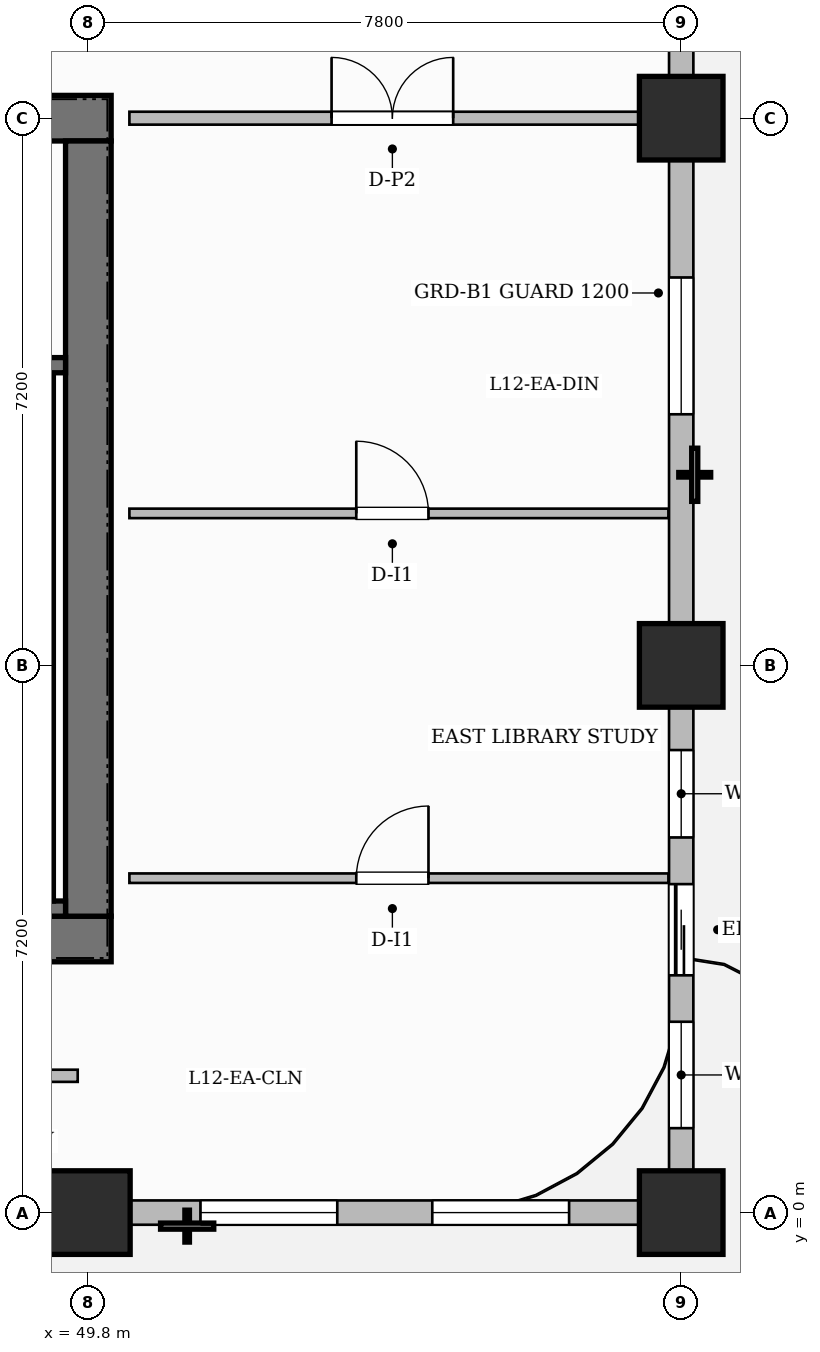
"""IFC4 building model, lengths in metres.
Left out: names, types, materials, properties, quantities, classifications, styles, units other than length and angle.
Written with IfcOpenShell. Run it as: python <this file> out.ifc"""

import sys

from ifc_helpers import new_model, si_unit, direction, frame, frame_2d, origin, origin_2d, place, context, subcontext, project, spatial, rectangle, extrude, source, transform, mapped, element, fill, save


model = new_model("IFC4")
c1 = context("Model", 3, precision=1e-05, world=origin(), true_north=direction((0.0, 1.0)))
c2 = subcontext(c1, "Body", "Model", "MODEL_VIEW")
j1 = project(units=[si_unit("LENGTHUNIT", "METRE"), si_unit("PLANEANGLEUNIT", "RADIAN")], contexts=[c1])
p1 = place(None, origin())
s1 = spatial("IfcSite", under=j1, at=p1, CompositionType="ELEMENT")
p2 = place(p1, origin())
s2 = spatial("IfcBuilding", under=s1, at=p2, CompositionType="ELEMENT")
p3 = place(p2, frame((0.0, 0.0, 54.6)))
s3 = spatial("IfcBuildingStorey", under=s2, at=p3, CompositionType="ELEMENT", Elevation=54.6)
p4 = place(p3, frame((34.5, 3.6, 0.0), z_axis=(0.0, 0.0, 1.0), x_axis=(1.0, 0.0, 0.0)))
e1 = element("IfcWall", 1, at=p4, inside=s3, PredefinedType="SHEAR", context=c2, shape_type="SweptSolid", body=[
    extrude(rectangle(XDim=15.6, YDim=0.6, at=frame_2d((7.8, 0.0))), origin(), (0.0, 0.0, 1.0), 3.7),
])
p5 = place(p4, frame((4.77, 0.0, 0.0)))
e2 = element("IfcOpeningElement", 2, at=p5, cuts=e1, PredefinedType="OPENING", context=c2, shape_type="SweptSolid", body=[
    extrude(rectangle(XDim=0.9, YDim=2.1, at=frame_2d((0.45, 1.05))), frame((0.0, 0.31, 0.0), z_axis=(0.0, -1.0, 0.0), x_axis=(1.0, 0.0, 0.0)), (0.0, 0.0, 1.0), 0.62),
])
p6 = place(p4, frame((7.15, 0.0, 0.0)))
e3 = element("IfcOpeningElement", 3, at=p6, cuts=e1, PredefinedType="OPENING", context=c2, shape_type="SweptSolid", body=[
    extrude(rectangle(XDim=0.9, YDim=2.1, at=frame_2d((0.45, 1.05))), frame((0.0, 0.31, 0.0), z_axis=(0.0, -1.0, 0.0), x_axis=(1.0, 0.0, 0.0)), (0.0, 0.0, 1.0), 0.62),
])
p7 = place(p3, frame((34.5, 14.4, 0.0), z_axis=(0.0, 0.0, 1.0), x_axis=(1.0, 0.0, 0.0)))
e4 = element("IfcWall", 4, at=p7, inside=s3, PredefinedType="SHEAR", context=c2, shape_type="SweptSolid", body=[
    extrude(rectangle(XDim=15.6, YDim=0.6, at=frame_2d((7.8, 0.0))), origin(), (0.0, 0.0, 1.0), 3.7),
])
p8 = place(p7, frame((5.43, 0.0, 0.0)))
e5 = element("IfcOpeningElement", 5, at=p8, cuts=e4, PredefinedType="OPENING", context=c2, shape_type="SweptSolid", body=[
    extrude(rectangle(XDim=1.5, YDim=2.2, at=frame_2d((0.75, 1.1))), frame((0.0, 0.31, 0.0), z_axis=(0.0, -1.0, 0.0), x_axis=(1.0, 0.0, 0.0)), (0.0, 0.0, 1.0), 0.62),
])
p9 = place(p7, frame((1.645, 0.0, 0.0)))
e6 = element("IfcOpeningElement", 6, at=p9, cuts=e4, PredefinedType="OPENING", context=c2, shape_type="SweptSolid", body=[
    extrude(rectangle(XDim=1.05, YDim=2.15, at=frame_2d((0.525, 1.075))), frame((0.0, 0.31, 0.0), z_axis=(0.0, -1.0, 0.0), x_axis=(1.0, 0.0, 0.0)), (0.0, 0.0, 1.0), 0.62),
])
p10 = place(p7, frame((11.275, 0.0, 0.0)))
e7 = element("IfcOpeningElement", 7, at=p10, cuts=e4, PredefinedType="OPENING", context=c2, shape_type="SweptSolid", body=[
    extrude(rectangle(XDim=1.05, YDim=2.15, at=frame_2d((0.525, 1.075))), frame((0.0, 0.31, 0.0), z_axis=(0.0, -1.0, 0.0), x_axis=(1.0, 0.0, 0.0)), (0.0, 0.0, 1.0), 0.62),
])
p11 = place(p3, frame((49.8, 3.9, 0.0), z_axis=(0.0, 0.0, 1.0), x_axis=(0.0, 1.0, 0.0)))
e8 = element("IfcWall", 8, at=p11, inside=s3, PredefinedType="SHEAR", context=c2, shape_type="SweptSolid", body=[
    extrude(rectangle(XDim=10.2, YDim=0.6, at=frame_2d((5.1, 0.0))), origin(), (0.0, 0.0, 1.0), 3.7),
])
m1 = source(origin(), c2, "Body", "SweptSolid", [
    extrude(rectangle(XDim=1.1, YDim=1.1, at=origin_2d()), origin(), (0.0, 0.0, 1.0), 3.7),
])
for number, where, z_axis, x_axis in (
    (9, (49.8, 0.0, 0.0), (0.0, 0.0, 1.0), (1.0, 0.0, 0.0)),
    (10, (57.6, 0.0, 0.0), (0.0, 0.0, 1.0), (1.0, 0.0, 0.0)),
    (11, (57.6, 7.2, 0.0), (0.0, 0.0, 1.0), (1.0, 0.0, 0.0)),
    (12, (57.6, 14.4, 0.0), (0.0, 0.0, 1.0), (1.0, 0.0, 0.0)),
):
    element("IfcColumn", number, at=place(p3, frame(where, z_axis=z_axis, x_axis=x_axis)), inside=s3, PredefinedType="COLUMN", context=c2, shape_type="MappedRepresentation", body=[
        mapped(m1, transform((0.0, 0.0, 0.0), scale=1.0)),
    ])
p12 = place(p3, frame((43.12, 4.0, 0.0), z_axis=(0.0, 0.0, 1.0), x_axis=(1.0, 0.0, 0.0)))
e13 = element("IfcWall", 13, at=p12, inside=s3, PredefinedType="SHEAR", context=c2, shape_type="SweptSolid", body=[
    extrude(rectangle(XDim=6.38, YDim=0.2, at=frame_2d((3.19, 0.0))), origin(), (0.0, 0.0, 1.0), 3.7),
])
p13 = place(p3, frame((49.24, 4.1, 0.0), z_axis=(0.0, 0.0, 1.0), x_axis=(0.0, 1.0, 0.0)))
e14 = element("IfcWall", 14, at=p13, inside=s3, PredefinedType="SHEAR", context=c2, shape_type="SweptSolid", body=[
    extrude(rectangle(XDim=6.95, YDim=0.2, at=frame_2d((3.475, 0.0))), origin(), (0.0, 0.0, 1.0), 3.7),
])
p14 = place(p3, frame((43.12, 11.15, 0.0), z_axis=(0.0, 0.0, 1.0), x_axis=(1.0, 0.0, 0.0)))
e15 = element("IfcWall", 15, at=p14, inside=s3, PredefinedType="SHEAR", context=c2, shape_type="SweptSolid", body=[
    extrude(rectangle(XDim=6.38, YDim=0.2, at=frame_2d((3.19, 0.0))), origin(), (0.0, 0.0, 1.0), 3.7),
])
p15 = place(p14, frame((1.045, 0.0, 0.0)))
e16 = element("IfcOpeningElement", 16, at=p15, cuts=e15, PredefinedType="OPENING", context=c2, shape_type="SweptSolid", body=[
    extrude(rectangle(XDim=1.05, YDim=2.2, at=frame_2d((0.525, 1.1))), frame((0.0, 0.11, 0.0), z_axis=(0.0, -1.0, 0.0), x_axis=(1.0, 0.0, 0.0)), (0.0, 0.0, 1.0), 0.22),
])
p16 = place(p14, frame((4.125, 0.0, 0.0)))
e17 = element("IfcOpeningElement", 17, at=p16, cuts=e15, PredefinedType="OPENING", context=c2, shape_type="SweptSolid", body=[
    extrude(rectangle(XDim=1.05, YDim=2.2, at=frame_2d((0.525, 1.1))), frame((0.0, 0.11, 0.0), z_axis=(0.0, -1.0, 0.0), x_axis=(1.0, 0.0, 0.0)), (0.0, 0.0, 1.0), 0.22),
])
p17 = place(p3, frame((30.29, 1.8, 0.0), z_axis=(0.0, 0.0, 1.0), x_axis=(1.0, 0.0, 0.0)))
e18 = element("IfcWall", 18, at=p17, inside=s3, PredefinedType="PARTITIONING", context=c2, shape_type="SweptSolid", body=[
    extrude(rectangle(XDim=19.37, YDim=0.16, at=frame_2d((9.685, 0.0))), origin(), (0.0, 0.0, 1.0), 3.45),
])
p18 = place(p17, frame((2.916, 0.0, 0.0)))
e19 = element("IfcOpeningElement", 19, at=p18, cuts=e18, PredefinedType="OPENING", context=c2, shape_type="SweptSolid", body=[
    extrude(rectangle(XDim=0.9, YDim=2.15, at=frame_2d((0.45, 1.075))), frame((0.0, 0.09, 0.0), z_axis=(0.0, -1.0, 0.0), x_axis=(1.0, 0.0, 0.0)), (0.0, 0.0, 1.0), 0.18),
])
p19 = place(p17, frame((9.66, 0.0, 0.0)))
e20 = element("IfcOpeningElement", 20, at=p19, cuts=e18, PredefinedType="OPENING", context=c2, shape_type="SweptSolid", body=[
    extrude(rectangle(XDim=0.9, YDim=2.15, at=frame_2d((0.45, 1.075))), frame((0.0, 0.09, 0.0), z_axis=(0.0, -1.0, 0.0), x_axis=(1.0, 0.0, 0.0)), (0.0, 0.0, 1.0), 0.18),
])
p20 = place(p17, frame((15.86, 0.0, 0.0)))
e21 = element("IfcOpeningElement", 21, at=p20, cuts=e18, PredefinedType="OPENING", context=c2, shape_type="SweptSolid", body=[
    extrude(rectangle(XDim=0.9, YDim=2.15, at=frame_2d((0.45, 1.075))), frame((0.0, 0.09, 0.0), z_axis=(0.0, -1.0, 0.0), x_axis=(1.0, 0.0, 0.0)), (0.0, 0.0, 1.0), 0.18),
])
p21 = place(p3, frame((50.34, 14.4, 0.0), z_axis=(0.0, 0.0, 1.0), x_axis=(1.0, 0.0, 0.0)))
e22 = element("IfcWall", 22, at=p21, inside=s3, PredefinedType="PARTITIONING", context=c2, shape_type="SweptSolid", body=[
    extrude(rectangle(XDim=7.07, YDim=0.17, at=frame_2d((3.535, 0.0))), origin(), (0.0, 0.0, 1.0), 2.885),
])
p22 = place(p21, frame((2.66, 0.0, 0.0)))
e23 = element("IfcOpeningElement", 23, at=p22, cuts=e22, PredefinedType="OPENING", context=c2, shape_type="SweptSolid", body=[
    extrude(rectangle(XDim=1.6, YDim=2.4, at=frame_2d((0.8, 1.2))), frame((0.0, 0.095, 0.0), z_axis=(0.0, -1.0, 0.0), x_axis=(1.0, 0.0, 0.0)), (0.0, 0.0, 1.0), 0.19),
])
p23 = place(p3, frame((50.34, 9.2, 0.0), z_axis=(0.0, 0.0, 1.0), x_axis=(1.0, 0.0, 0.0)))
e24 = element("IfcWall", 24, at=p23, inside=s3, PredefinedType="PARTITIONING", context=c2, shape_type="SweptSolid", body=[
    extrude(rectangle(XDim=7.092, YDim=0.125, at=frame_2d((3.546, 0.0))), origin(), (0.0, 0.0, 1.0), 3.45),
])
p24 = place(p23, frame((2.985, 0.0, 0.0)))
e25 = element("IfcOpeningElement", 25, at=p24, cuts=e24, PredefinedType="OPENING", context=c2, shape_type="SweptSolid", body=[
    extrude(rectangle(XDim=0.95, YDim=2.15, at=frame_2d((0.475, 1.075))), frame((0.0, 0.073, 0.0), z_axis=(0.0, -1.0, 0.0), x_axis=(1.0, 0.0, 0.0)), (0.0, 0.0, 1.0), 0.145),
])
p25 = place(p3, frame((50.34, 4.4, 0.0), z_axis=(0.0, 0.0, 1.0), x_axis=(1.0, 0.0, 0.0)))
e26 = element("IfcWall", 26, at=p25, inside=s3, PredefinedType="PARTITIONING", context=c2, shape_type="SweptSolid", body=[
    extrude(rectangle(XDim=7.092, YDim=0.125, at=frame_2d((3.546, 0.0))), origin(), (0.0, 0.0, 1.0), 3.45),
])
p26 = place(p25, frame((2.985, 0.0, 0.0)))
e27 = element("IfcOpeningElement", 27, at=p26, cuts=e26, PredefinedType="OPENING", context=c2, shape_type="SweptSolid", body=[
    extrude(rectangle(XDim=0.95, YDim=2.15, at=frame_2d((0.475, 1.075))), frame((0.0, 0.073, 0.0), z_axis=(0.0, -1.0, 0.0), x_axis=(1.0, 0.0, 0.0)), (0.0, 0.0, 1.0), 0.145),
])
p27 = place(p3, frame((14.4, 0.0, 0.0), z_axis=(0.0, 0.0, 1.0), x_axis=(1.0, 0.0, 0.0)))
e28 = element("IfcWall", 28, at=p27, inside=s3, PredefinedType="SOLIDWALL", context=c2, shape_type="SweptSolid", body=[
    extrude(rectangle(XDim=43.2, YDim=0.32, at=frame_2d((21.6, 0.0))), origin(), (0.0, 0.0, 1.0), 2.885),
])
p28 = place(p27, frame((1.5, 0.0, 0.0)))
e29 = element("IfcOpeningElement", 29, at=p28, cuts=e28, PredefinedType="OPENING", context=c2, shape_type="SweptSolid", body=[
    extrude(rectangle(XDim=1.2, YDim=2.2, at=frame_2d((0.6, 1.1))), frame((0.0, 0.17, 0.0), z_axis=(0.0, -1.0, 0.0), x_axis=(1.0, 0.0, 0.0)), (0.0, 0.0, 1.0), 0.34),
])
p29 = place(p27, frame((4.654, 0.0, 0.8)))
e30 = element("IfcOpeningElement", 30, at=p29, cuts=e28, PredefinedType="OPENING", context=c2, shape_type="SweptSolid", body=[
    extrude(rectangle(XDim=1.4, YDim=1.85, at=frame_2d((0.7, 0.925))), frame((0.0, 0.17, 0.0), z_axis=(0.0, -1.0, 0.0), x_axis=(1.0, 0.0, 0.0)), (0.0, 0.0, 1.0), 0.34),
])
p30 = place(p27, frame((8.181, 0.0, 0.8)))
e31 = element("IfcOpeningElement", 31, at=p30, cuts=e28, PredefinedType="OPENING", context=c2, shape_type="SweptSolid", body=[
    extrude(rectangle(XDim=0.95, YDim=1.75, at=frame_2d((0.475, 0.875))), frame((0.0, 0.17, 0.0), z_axis=(0.0, -1.0, 0.0), x_axis=(1.0, 0.0, 0.0)), (0.0, 0.0, 1.0), 0.34),
])
p31 = place(p27, frame((10.564, 0.0, 0.8)))
e32 = element("IfcOpeningElement", 32, at=p31, cuts=e28, PredefinedType="OPENING", context=c2, shape_type="SweptSolid", body=[
    extrude(rectangle(XDim=1.8, YDim=1.85, at=frame_2d((0.9, 0.925))), frame((0.0, 0.17, 0.0), z_axis=(0.0, -1.0, 0.0), x_axis=(1.0, 0.0, 0.0)), (0.0, 0.0, 1.0), 0.34),
])
p32 = place(p27, frame((16.804, 0.0, 0.8)))
e33 = element("IfcOpeningElement", 33, at=p32, cuts=e28, PredefinedType="OPENING", context=c2, shape_type="SweptSolid", body=[
    extrude(rectangle(XDim=1.8, YDim=1.85, at=frame_2d((0.9, 0.925))), frame((0.0, 0.17, 0.0), z_axis=(0.0, -1.0, 0.0), x_axis=(1.0, 0.0, 0.0)), (0.0, 0.0, 1.0), 0.34),
])
p33 = place(p27, frame((21.521, 0.0, 0.8)))
e34 = element("IfcOpeningElement", 34, at=p33, cuts=e28, PredefinedType="OPENING", context=c2, shape_type="SweptSolid", body=[
    extrude(rectangle(XDim=0.95, YDim=1.75, at=frame_2d((0.475, 0.875))), frame((0.0, 0.17, 0.0), z_axis=(0.0, -1.0, 0.0), x_axis=(1.0, 0.0, 0.0)), (0.0, 0.0, 1.0), 0.34),
])
p34 = place(p27, frame((23.904, 0.0, 0.8)))
e35 = element("IfcOpeningElement", 35, at=p34, cuts=e28, PredefinedType="OPENING", context=c2, shape_type="SweptSolid", body=[
    extrude(rectangle(XDim=1.8, YDim=1.85, at=frame_2d((0.9, 0.925))), frame((0.0, 0.17, 0.0), z_axis=(0.0, -1.0, 0.0), x_axis=(1.0, 0.0, 0.0)), (0.0, 0.0, 1.0), 0.34),
])
p35 = place(p27, frame((29.681, 0.0, 0.8)))
e36 = element("IfcOpeningElement", 36, at=p35, cuts=e28, PredefinedType="OPENING", context=c2, shape_type="SweptSolid", body=[
    extrude(rectangle(XDim=1.8, YDim=1.85, at=frame_2d((0.9, 0.925))), frame((0.0, 0.17, 0.0), z_axis=(0.0, -1.0, 0.0), x_axis=(1.0, 0.0, 0.0)), (0.0, 0.0, 1.0), 0.34),
])
p36 = place(p27, frame((32.327, 0.0, 0.8)))
e37 = element("IfcOpeningElement", 37, at=p36, cuts=e28, PredefinedType="OPENING", context=c2, shape_type="SweptSolid", body=[
    extrude(rectangle(XDim=1.8, YDim=1.85, at=frame_2d((0.9, 0.925))), frame((0.0, 0.17, 0.0), z_axis=(0.0, -1.0, 0.0), x_axis=(1.0, 0.0, 0.0)), (0.0, 0.0, 1.0), 0.34),
])
p37 = place(p27, frame((36.875, 0.0, 0.8)))
e38 = element("IfcOpeningElement", 38, at=p37, cuts=e28, PredefinedType="OPENING", context=c2, shape_type="SweptSolid", body=[
    extrude(rectangle(XDim=1.8, YDim=1.85, at=frame_2d((0.9, 0.925))), frame((0.0, 0.17, 0.0), z_axis=(0.0, -1.0, 0.0), x_axis=(1.0, 0.0, 0.0)), (0.0, 0.0, 1.0), 0.34),
])
p38 = place(p27, frame((39.925, 0.0, 0.8)))
e39 = element("IfcOpeningElement", 39, at=p38, cuts=e28, PredefinedType="OPENING", context=c2, shape_type="SweptSolid", body=[
    extrude(rectangle(XDim=1.8, YDim=1.85, at=frame_2d((0.9, 0.925))), frame((0.0, 0.17, 0.0), z_axis=(0.0, -1.0, 0.0), x_axis=(1.0, 0.0, 0.0)), (0.0, 0.0, 1.0), 0.34),
])
p39 = place(p3, frame((57.6, 0.05, 0.0), z_axis=(0.0, 0.0, 1.0), x_axis=(0.0, 1.0, 0.0)))
e40 = element("IfcWall", 40, at=p39, inside=s3, PredefinedType="SOLIDWALL", context=c2, shape_type="SweptSolid", body=[
    extrude(rectangle(XDim=21.5, YDim=0.32, at=frame_2d((10.75, 0.0))), origin(), (0.0, 0.0, 1.0), 2.885),
])
p40 = place(p39, frame((3.072, 0.0, 0.0)))
e41 = element("IfcOpeningElement", 41, at=p40, cuts=e40, PredefinedType="OPENING", context=c2, shape_type="SweptSolid", body=[
    extrude(rectangle(XDim=1.2, YDim=2.2, at=frame_2d((0.6, 1.1))), frame((0.0, 0.17, 0.0), z_axis=(0.0, -1.0, 0.0), x_axis=(1.0, 0.0, 0.0)), (0.0, 0.0, 1.0), 0.34),
])
p41 = place(p39, frame((1.061, 0.0, 0.8)))
e42 = element("IfcOpeningElement", 42, at=p41, cuts=e40, PredefinedType="OPENING", context=c2, shape_type="SweptSolid", body=[
    extrude(rectangle(XDim=1.4, YDim=1.85, at=frame_2d((0.7, 0.925))), frame((0.0, 0.17, 0.0), z_axis=(0.0, -1.0, 0.0), x_axis=(1.0, 0.0, 0.0)), (0.0, 0.0, 1.0), 0.34),
])
p42 = place(p39, frame((4.886, 0.0, 0.8)))
e43 = element("IfcOpeningElement", 43, at=p42, cuts=e40, PredefinedType="OPENING", context=c2, shape_type="SweptSolid", body=[
    extrude(rectangle(XDim=1.15, YDim=1.8, at=frame_2d((0.575, 0.9))), frame((0.0, 0.17, 0.0), z_axis=(0.0, -1.0, 0.0), x_axis=(1.0, 0.0, 0.0)), (0.0, 0.0, 1.0), 0.34),
])
p43 = place(p39, frame((10.454, 0.0, 0.8)))
e44 = element("IfcOpeningElement", 44, at=p43, cuts=e40, PredefinedType="OPENING", context=c2, shape_type="SweptSolid", body=[
    extrude(rectangle(XDim=1.8, YDim=1.85, at=frame_2d((0.9, 0.925))), frame((0.0, 0.17, 0.0), z_axis=(0.0, -1.0, 0.0), x_axis=(1.0, 0.0, 0.0)), (0.0, 0.0, 1.0), 0.34),
])
p44 = place(p39, frame((15.621, 0.0, 0.8)))
e45 = element("IfcOpeningElement", 45, at=p44, cuts=e40, PredefinedType="OPENING", context=c2, shape_type="SweptSolid", body=[
    extrude(rectangle(XDim=1.4, YDim=1.85, at=frame_2d((0.7, 0.925))), frame((0.0, 0.17, 0.0), z_axis=(0.0, -1.0, 0.0), x_axis=(1.0, 0.0, 0.0)), (0.0, 0.0, 1.0), 0.34),
])
p45 = place(p39, frame((18.229, 0.0, 0.8)))
e46 = element("IfcOpeningElement", 46, at=p45, cuts=e40, PredefinedType="OPENING", context=c2, shape_type="SweptSolid", body=[
    extrude(rectangle(XDim=1.8, YDim=1.85, at=frame_2d((0.9, 0.925))), frame((0.0, 0.17, 0.0), z_axis=(0.0, -1.0, 0.0), x_axis=(1.0, 0.0, 0.0)), (0.0, 0.0, 1.0), 0.34),
])
m2 = source(origin(), c2, "Body", "SweptSolid", [
    extrude(rectangle(XDim=1.6, YDim=2.4, at=frame_2d((0.8, 1.2))), frame((0.0, 0.025, 0.0), z_axis=(0.0, -1.0, 0.0), x_axis=(1.0, 0.0, 0.0)), (0.0, 0.0, 1.0), 0.05),
])
p46 = place(p22, origin())
e47 = element("IfcDoor", 47, at=p46, inside=s3, OperationType="DOUBLE_DOOR_SINGLE_SWING", PredefinedType="DOOR", context=c2, shape_type="MappedRepresentation", body=[
    mapped(m2, transform((0.0, 0.0, 0.0), scale=1.0)),
])
fill(e23, e47)
m3 = source(origin(), c2, "Body", "SweptSolid", [
    extrude(rectangle(XDim=0.95, YDim=2.15, at=frame_2d((0.475, 1.075))), frame((0.0, 0.025, 0.0), z_axis=(0.0, -1.0, 0.0), x_axis=(1.0, 0.0, 0.0)), (0.0, 0.0, 1.0), 0.05),
])
p47 = place(p24, origin())
e48 = element("IfcDoor", 48, at=p47, inside=s3, OperationType="SINGLE_SWING_LEFT", PredefinedType="DOOR", context=c2, shape_type="MappedRepresentation", body=[
    mapped(m3, transform((0.0, 0.0, 0.0), scale=1.0)),
])
fill(e25, e48)
p48 = place(p26, origin())
e49 = element("IfcDoor", 49, at=p48, inside=s3, OperationType="SINGLE_SWING_RIGHT", PredefinedType="DOOR", context=c2, shape_type="MappedRepresentation", body=[
    mapped(m3, transform((0.0, 0.0, 0.0), scale=1.0)),
])
fill(e27, e49)
m4 = source(origin(), c2, "Body", "SweptSolid", [
    extrude(rectangle(XDim=1.2, YDim=2.2, at=frame_2d((0.6, 1.1))), frame((0.0, 0.025, 0.0), z_axis=(0.0, -1.0, 0.0), x_axis=(1.0, 0.0, 0.0)), (0.0, 0.0, 1.0), 0.05),
])
p49 = place(p40, origin())
e50 = element("IfcDoor", 50, at=p49, inside=s3, OperationType="SLIDING_TO_LEFT", PredefinedType="DOOR", context=c2, shape_type="MappedRepresentation", body=[
    mapped(m4, transform((0.0, 0.0, 0.0), scale=1.0)),
])
fill(e41, e50)
m5 = source(origin(), c2, "Body", "SweptSolid", [
    extrude(rectangle(XDim=1.8, YDim=1.85, at=frame_2d((0.9, 0.925))), frame((0.0, 0.03, 0.0), z_axis=(0.0, -1.0, 0.0), x_axis=(1.0, 0.0, 0.0)), (0.0, 0.0, 1.0), 0.06),
])
p50 = place(p37, origin())
e51 = element("IfcWindow", 51, at=p50, inside=s3, PartitioningType="DOUBLE_PANEL_VERTICAL", PredefinedType="WINDOW", context=c2, shape_type="MappedRepresentation", body=[
    mapped(m5, transform((0.0, 0.0, 0.0), scale=1.0)),
])
fill(e38, e51)
p51 = place(p38, origin())
e52 = element("IfcWindow", 52, at=p51, inside=s3, PartitioningType="DOUBLE_PANEL_VERTICAL", PredefinedType="WINDOW", context=c2, shape_type="MappedRepresentation", body=[
    mapped(m5, transform((0.0, 0.0, 0.0), scale=1.0)),
])
fill(e39, e52)
m6 = source(origin(), c2, "Body", "SweptSolid", [
    extrude(rectangle(XDim=1.4, YDim=1.85, at=frame_2d((0.7, 0.925))), frame((0.0, 0.03, 0.0), z_axis=(0.0, -1.0, 0.0), x_axis=(1.0, 0.0, 0.0)), (0.0, 0.0, 1.0), 0.06),
])
p52 = place(p41, origin())
e53 = element("IfcWindow", 53, at=p52, inside=s3, PartitioningType="SINGLE_PANEL", PredefinedType="WINDOW", context=c2, shape_type="MappedRepresentation", body=[
    mapped(m6, transform((0.0, 0.0, 0.0), scale=1.0)),
])
fill(e42, e53)
m7 = source(origin(), c2, "Body", "SweptSolid", [
    extrude(rectangle(XDim=1.15, YDim=1.8, at=frame_2d((0.575, 0.9))), frame((0.0, 0.03, 0.0), z_axis=(0.0, -1.0, 0.0), x_axis=(1.0, 0.0, 0.0)), (0.0, 0.0, 1.0), 0.06),
])
p53 = place(p42, origin())
e54 = element("IfcWindow", 54, at=p53, inside=s3, PartitioningType="SINGLE_PANEL", PredefinedType="WINDOW", context=c2, shape_type="MappedRepresentation", body=[
    mapped(m7, transform((0.0, 0.0, 0.0), scale=1.0)),
])
fill(e43, e54)
p54 = place(p43, origin())
e55 = element("IfcWindow", 55, at=p54, inside=s3, PartitioningType="DOUBLE_PANEL_VERTICAL", PredefinedType="WINDOW", context=c2, shape_type="MappedRepresentation", body=[
    mapped(m5, transform((0.0, 0.0, 0.0), scale=1.0)),
])
fill(e44, e55)
save(model, sys.argv[1])
